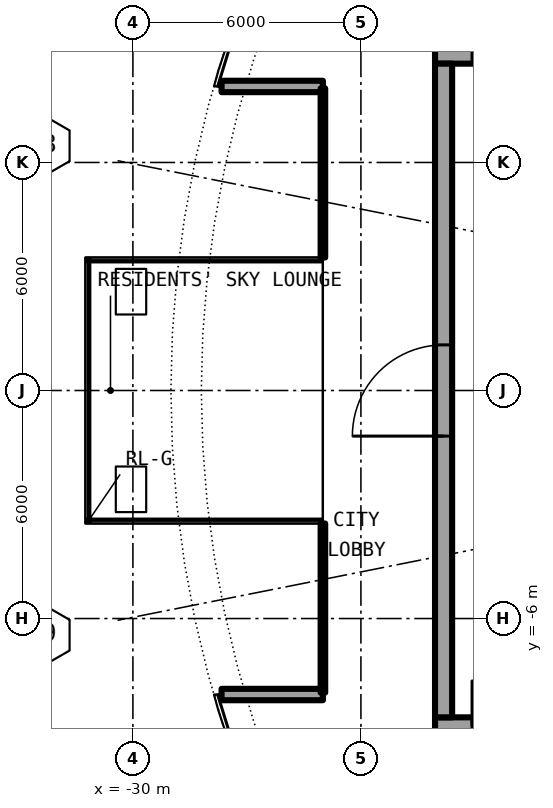
"""IFC4 building model, lengths in metres.
Left out: names, types, materials, properties, quantities, classifications, styles, units other than length and angle.
Written with IfcOpenShell. Run it as: python <this file> out.ifc"""

import sys

from ifc_helpers import new_model, si_unit, direction, frame, frame_2d, origin, place, context, subcontext, project, spatial, rectangle, extrude, element, fill, save


model = new_model("IFC4")
c1 = context("Model", 3, precision=1e-05, world=origin(), true_north=direction((0.0, 1.0)))
c2 = subcontext(c1, "Body", "Model", "MODEL_VIEW")
j1 = project(units=[si_unit("LENGTHUNIT", "METRE"), si_unit("PLANEANGLEUNIT", "RADIAN")], contexts=[c1])
p1 = place(None, origin())
s1 = spatial("IfcSite", under=j1, at=p1, CompositionType="ELEMENT")
p2 = place(p1, origin())
s2 = spatial("IfcBuilding", under=s1, at=p2, CompositionType="ELEMENT")
p3 = place(p2, frame((0.0, 0.0, 221.85)))
s3 = spatial("IfcBuildingStorey", under=s2, at=p3, CompositionType="ELEMENT", Elevation=221.85)
for number, where, z_axis, x_axis in (
    (1, (-25.0, 8.0, 0.0), (0.0, 0.0, 1.0), (-1.0, 0.0, 0.0)),
    (2, (-25.0, -8.0, 0.0), (0.0, 0.0, 1.0), (-1.0, 0.0, 0.0)),
):
    element("IfcWall", number, at=place(p3, frame(where, z_axis=z_axis, x_axis=x_axis)), inside=s3, PredefinedType="SOLIDWALL", context=c2, shape_type="SweptSolid", body=[
        extrude(rectangle(XDim=2.667, YDim=0.3, at=frame_2d((1.333, 0.0))), origin(), (0.0, 0.0, 1.0), 5.75),
    ])
p4 = place(p3, frame((-22.05, -8.825, 0.0), z_axis=(0.0, 0.0, 1.0), x_axis=(1.0, 0.0, 0.0)))
e3 = element("IfcWall", 3, at=p4, inside=s3, PredefinedType="SHEAR", context=c2, shape_type="SweptSolid", body=[
    extrude(rectangle(XDim=13.5, YDim=0.45, at=frame_2d((6.75, 0.0))), origin(), (0.0, 0.0, 1.0), 6.1),
])
p5 = place(p4, frame((0.975, 0.0, 0.0)))
e4 = element("IfcOpeningElement", 4, at=p5, cuts=e3, PredefinedType="OPENING", context=c2, shape_type="SweptSolid", body=[
    extrude(rectangle(XDim=1.2, YDim=2.3, at=frame_2d((0.6, 1.15))), frame((0.0, 0.235, 0.0), z_axis=(0.0, -1.0, 0.0), x_axis=(1.0, 0.0, 0.0)), (0.0, 0.0, 1.0), 0.47),
])
p6 = place(p3, frame((-8.55, 8.825, 0.0), z_axis=(0.0, 0.0, 1.0), x_axis=(-1.0, 0.0, 0.0)))
e5 = element("IfcWall", 5, at=p6, inside=s3, PredefinedType="SHEAR", context=c2, shape_type="SweptSolid", body=[
    extrude(rectangle(XDim=13.5, YDim=0.45, at=frame_2d((6.75, 0.0))), origin(), (0.0, 0.0, 1.0), 6.1),
])
p7 = place(p6, frame((11.325, 0.0, 0.0)))
e6 = element("IfcOpeningElement", 6, at=p7, cuts=e5, PredefinedType="OPENING", context=c2, shape_type="SweptSolid", body=[
    extrude(rectangle(XDim=1.2, YDim=2.3, at=frame_2d((0.6, 1.15))), frame((0.0, 0.235, 0.0), z_axis=(0.0, -1.0, 0.0), x_axis=(1.0, 0.0, 0.0)), (0.0, 0.0, 1.0), 0.47),
])
p8 = place(p3, frame((-21.825, -8.6, 0.0), z_axis=(0.0, 0.0, 1.0), x_axis=(0.0, 1.0, 0.0)))
e7 = element("IfcWall", 7, at=p8, inside=s3, PredefinedType="SHEAR", context=c2, shape_type="SweptSolid", body=[
    extrude(rectangle(XDim=17.2, YDim=0.45, at=frame_2d((8.6, 0.0))), origin(), (0.0, 0.0, 1.0), 6.1),
])
p9 = place(p8, frame((7.4, 0.0, 0.0)))
e8 = element("IfcOpeningElement", 8, at=p9, cuts=e7, PredefinedType="OPENING", context=c2, shape_type="SweptSolid", body=[
    extrude(rectangle(XDim=2.4, YDim=2.3, at=frame_2d((1.2, 1.15))), frame((0.0, 0.235, 0.0), z_axis=(0.0, -1.0, 0.0), x_axis=(1.0, 0.0, 0.0)), (0.0, 0.0, 1.0), 0.47),
])
p10 = place(p3, frame((-25.0, 3.5, 0.0), z_axis=(0.0, 0.0, 1.0), x_axis=(0.0, 1.0, 0.0)))
e9 = element("IfcWall", 9, at=p10, inside=s3, PredefinedType="PARTITIONING", context=c2, shape_type="SweptSolid", body=[
    extrude(rectangle(XDim=4.45, YDim=0.12, at=frame_2d((2.225, 0.0))), origin(), (0.0, 0.0, 1.0), 5.75),
])
p11 = place(p10, frame((0.4, 0.0, 0.1)))
e10 = element("IfcOpeningElement", 10, at=p11, cuts=e9, PredefinedType="OPENING", context=c2, shape_type="SweptSolid", body=[
    extrude(rectangle(XDim=3.6, YDim=5.4, at=frame_2d((1.8, 2.7))), frame((0.0, 0.07, 0.0), z_axis=(0.0, -1.0, 0.0), x_axis=(1.0, 0.0, 0.0)), (0.0, 0.0, 1.0), 0.14),
])
p12 = place(p3, frame((-25.0, -3.5, 0.0), z_axis=(0.0, 0.0, 1.0), x_axis=(0.0, -1.0, 0.0)))
e11 = element("IfcWall", 11, at=p12, inside=s3, PredefinedType="PARTITIONING", context=c2, shape_type="SweptSolid", body=[
    extrude(rectangle(XDim=4.45, YDim=0.12, at=frame_2d((2.225, 0.0))), origin(), (0.0, 0.0, 1.0), 5.75),
])
p13 = place(p12, frame((0.4, 0.0, 0.1)))
e12 = element("IfcOpeningElement", 12, at=p13, cuts=e11, PredefinedType="OPENING", context=c2, shape_type="SweptSolid", body=[
    extrude(rectangle(XDim=3.6, YDim=5.4, at=frame_2d((1.8, 2.7))), frame((0.0, 0.07, 0.0), z_axis=(0.0, -1.0, 0.0), x_axis=(1.0, 0.0, 0.0)), (0.0, 0.0, 1.0), 0.14),
])
p14 = place(p5, origin())
e13 = element("IfcDoor", 13, at=p14, inside=s3, OperationType="SINGLE_SWING_RIGHT", PredefinedType="DOOR", context=c2, shape_type="SweptSolid", body=[
    extrude(rectangle(XDim=1.2, YDim=2.3, at=frame_2d((0.6, 1.15))), frame((0.0, 0.025, 0.0), z_axis=(0.0, -1.0, 0.0), x_axis=(1.0, 0.0, 0.0)), (0.0, 0.0, 1.0), 0.05),
])
fill(e4, e13)
p15 = place(p7, origin())
e14 = element("IfcDoor", 14, at=p15, inside=s3, OperationType="SINGLE_SWING_LEFT", PredefinedType="DOOR", context=c2, shape_type="SweptSolid", body=[
    extrude(rectangle(XDim=1.2, YDim=2.3, at=frame_2d((0.6, 1.15))), frame((0.0, 0.025, 0.0), z_axis=(0.0, -1.0, 0.0), x_axis=(1.0, 0.0, 0.0)), (0.0, 0.0, 1.0), 0.05),
])
fill(e6, e14)
p16 = place(p9, origin())
e15 = element("IfcDoor", 15, at=p16, inside=s3, OperationType="SINGLE_SWING_LEFT", PredefinedType="DOOR", context=c2, shape_type="SweptSolid", body=[
    extrude(rectangle(XDim=2.4, YDim=2.3, at=frame_2d((1.2, 1.15))), frame((0.0, 0.025, 0.0), z_axis=(0.0, -1.0, 0.0), x_axis=(1.0, 0.0, 0.0)), (0.0, 0.0, 1.0), 0.05),
])
fill(e8, e15)
p17 = place(p11, origin())
e16 = element("IfcWindow", 16, at=p17, inside=s3, PartitioningType="SINGLE_PANEL", PredefinedType="WINDOW", context=c2, shape_type="SweptSolid", body=[
    extrude(rectangle(XDim=3.6, YDim=5.4, at=frame_2d((1.8, 2.7))), frame((0.0, 0.03, 0.0), z_axis=(0.0, -1.0, 0.0), x_axis=(1.0, 0.0, 0.0)), (0.0, 0.0, 1.0), 0.06),
])
fill(e10, e16)
p18 = place(p13, origin())
e17 = element("IfcWindow", 17, at=p18, inside=s3, PartitioningType="SINGLE_PANEL", PredefinedType="WINDOW", context=c2, shape_type="SweptSolid", body=[
    extrude(rectangle(XDim=3.6, YDim=5.4, at=frame_2d((1.8, 2.7))), frame((0.0, 0.03, 0.0), z_axis=(0.0, -1.0, 0.0), x_axis=(1.0, 0.0, 0.0)), (0.0, 0.0, 1.0), 0.06),
])
fill(e12, e17)
save(model, sys.argv[1])
